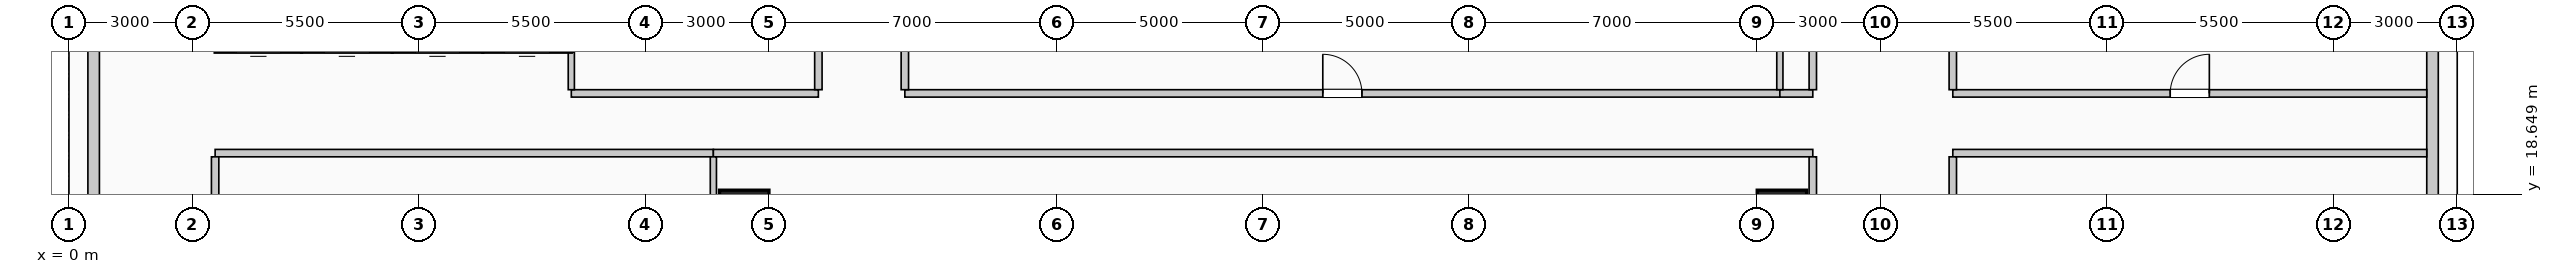
"""IFC4 building model, lengths in metres.
Left out: names, types, materials, properties, quantities, classifications, styles, units other than length and angle.
Written with IfcOpenShell. Run it as: python <this file> out.ifc"""

import sys

from ifc_helpers import new_model, si_unit, direction, frame, frame_2d, origin, origin_2d, place, context, subcontext, project, spatial, rectangle, extrude, element, fill, save


model = new_model("IFC4")
c1 = context("Model", 3, precision=1e-05, world=origin(), true_north=direction((0.0, 1.0)))
c2 = subcontext(c1, "Body", "Model", "MODEL_VIEW")
j1 = project(units=[si_unit("LENGTHUNIT", "METRE"), si_unit("PLANEANGLEUNIT", "RADIAN")], contexts=[c1])
p1 = place(None, origin())
s1 = spatial("IfcSite", under=j1, at=p1, CompositionType="ELEMENT")
p2 = place(p1, origin())
s2 = spatial("IfcBuilding", under=s1, at=p2, CompositionType="ELEMENT")
p3 = place(p2, frame((0.0, 0.0, 50.6)))
s3 = spatial("IfcBuildingStorey", under=s2, at=p3, CompositionType="ELEMENT", Elevation=50.6)
for number, where, z_axis, x_axis in (
    (1, (16.4, 18.0, 0.0), (0.0, 0.0, 1.0), (1.0, 0.0, 0.0)),
    (2, (41.6, 18.0, 0.0), (0.0, 0.0, 1.0), (1.0, 0.0, 0.0)),
):
    element("IfcColumn", number, at=place(p3, frame(where, z_axis=z_axis, x_axis=x_axis)), inside=s3, PredefinedType="COLUMN", context=c2, shape_type="SweptSolid", body=[
        extrude(rectangle(XDim=1.2, YDim=1.5, at=origin_2d()), origin(), (0.0, 0.0, 1.0), 4.0),
    ])
for number, where, z_axis, x_axis in (
    (3, (0.6, 18.47, 0.0), (0.0, 0.0, 1.0), (0.0, 1.0, 0.0)),
    (4, (57.4, 25.53, 0.0), (0.0, 0.0, 1.0), (0.0, -1.0, 0.0)),
):
    element("IfcWall", number, at=place(p3, frame(where, z_axis=z_axis, x_axis=x_axis)), inside=s3, PredefinedType="SOLIDWALL", context=c2, shape_type="SweptSolid", body=[
        extrude(rectangle(XDim=7.06, YDim=0.28, at=frame_2d((3.53, 0.0))), origin(), (0.0, 0.0, 1.0), 2.85),
    ])
p4 = place(p3, frame((5.65, 22.25, 0.0), z_axis=(0.0, 0.0, 1.0), x_axis=(-1.0, 0.0, 0.0)))
e5 = element("IfcWall", 5, at=p4, inside=s3, PredefinedType="SOLIDWALL", context=c2, shape_type="SweptSolid", body=[
    extrude(rectangle(XDim=2.1, YDim=0.3, at=frame_2d((1.05, 0.0))), origin(), (0.0, 0.0, 1.0), 4.0),
])
p5 = place(p4, frame((0.5, 0.0, 0.0)))
e6 = element("IfcOpeningElement", 6, at=p5, cuts=e5, PredefinedType="OPENING", context=c2, shape_type="SweptSolid", body=[
    extrude(rectangle(XDim=1.1, YDim=2.2, at=frame_2d((0.55, 1.1))), frame((0.0, 0.16, 0.0), z_axis=(0.0, -1.0, 0.0), x_axis=(1.0, 0.0, 0.0)), (0.0, 0.0, 1.0), 0.32),
])
p6 = place(p3, frame((7.85, 22.25, 0.0), z_axis=(0.0, 0.0, 1.0), x_axis=(-1.0, 0.0, 0.0)))
e7 = element("IfcWall", 7, at=p6, inside=s3, PredefinedType="SOLIDWALL", context=c2, shape_type="SweptSolid", body=[
    extrude(rectangle(XDim=2.2, YDim=0.3, at=frame_2d((1.1, 0.0))), origin(), (0.0, 0.0, 1.0), 4.0),
])
p7 = place(p6, frame((0.55, 0.0, 0.0)))
e8 = element("IfcOpeningElement", 8, at=p7, cuts=e7, PredefinedType="OPENING", context=c2, shape_type="SweptSolid", body=[
    extrude(rectangle(XDim=1.1, YDim=2.2, at=frame_2d((0.55, 1.1))), frame((0.0, 0.16, 0.0), z_axis=(0.0, -1.0, 0.0), x_axis=(1.0, 0.0, 0.0)), (0.0, 0.0, 1.0), 0.32),
])
p8 = place(p3, frame((10.05, 22.25, 0.0), z_axis=(0.0, 0.0, 1.0), x_axis=(-1.0, 0.0, 0.0)))
e9 = element("IfcWall", 9, at=p8, inside=s3, PredefinedType="SOLIDWALL", context=c2, shape_type="SweptSolid", body=[
    extrude(rectangle(XDim=2.2, YDim=0.3, at=frame_2d((1.1, 0.0))), origin(), (0.0, 0.0, 1.0), 4.0),
])
p9 = place(p8, frame((0.55, 0.0, 0.0)))
e10 = element("IfcOpeningElement", 10, at=p9, cuts=e9, PredefinedType="OPENING", context=c2, shape_type="SweptSolid", body=[
    extrude(rectangle(XDim=1.1, YDim=2.2, at=frame_2d((0.55, 1.1))), frame((0.0, 0.16, 0.0), z_axis=(0.0, -1.0, 0.0), x_axis=(1.0, 0.0, 0.0)), (0.0, 0.0, 1.0), 0.32),
])
p10 = place(p3, frame((12.2, 22.25, 0.0), z_axis=(0.0, 0.0, 1.0), x_axis=(-1.0, 0.0, 0.0)))
e11 = element("IfcWall", 11, at=p10, inside=s3, PredefinedType="SOLIDWALL", context=c2, shape_type="SweptSolid", body=[
    extrude(rectangle(XDim=2.15, YDim=0.3, at=frame_2d((1.075, 0.0))), origin(), (0.0, 0.0, 1.0), 4.0),
])
p11 = place(p10, frame((0.525, 0.0, 0.0)))
e12 = element("IfcOpeningElement", 12, at=p11, cuts=e11, PredefinedType="OPENING", context=c2, shape_type="SweptSolid", body=[
    extrude(rectangle(XDim=1.1, YDim=2.2, at=frame_2d((0.55, 1.1))), frame((0.0, 0.16, 0.0), z_axis=(0.0, -1.0, 0.0), x_axis=(1.0, 0.0, 0.0)), (0.0, 0.0, 1.0), 0.32),
])
p12 = place(p3, frame((3.55, 19.65, 0.0), z_axis=(0.0, 0.0, 1.0), x_axis=(1.0, 0.0, 0.0)))
e13 = element("IfcWall", 13, at=p12, inside=s3, PredefinedType="PARTITIONING", context=c2, shape_type="SweptSolid", body=[
    extrude(rectangle(XDim=12.1, YDim=0.18, at=frame_2d((6.05, 0.0))), origin(), (0.0, 0.0, 1.0), 3.7),
])
p13 = place(p3, frame((15.65, 19.65, 0.0), z_axis=(0.0, 0.0, 1.0), x_axis=(1.0, 0.0, 0.0)))
e14 = element("IfcWall", 14, at=p13, inside=s3, PredefinedType="PARTITIONING", context=c2, shape_type="SweptSolid", body=[
    extrude(rectangle(XDim=26.7, YDim=0.18, at=frame_2d((13.35, 0.0))), origin(), (0.0, 0.0, 1.0), 3.7),
])
p14 = place(p3, frame((45.75, 19.65, 0.0), z_axis=(0.0, 0.0, 1.0), x_axis=(1.0, 0.0, 0.0)))
e15 = element("IfcWall", 15, at=p14, inside=s3, PredefinedType="PARTITIONING", context=c2, shape_type="SweptSolid", body=[
    extrude(rectangle(XDim=11.51, YDim=0.18, at=frame_2d((5.755, 0.0))), origin(), (0.0, 0.0, 1.0), 3.7),
])
p15 = place(p3, frame((12.2, 21.1, 0.0), z_axis=(0.0, 0.0, 1.0), x_axis=(1.0, 0.0, 0.0)))
e16 = element("IfcWall", 16, at=p15, inside=s3, PredefinedType="PARTITIONING", context=c2, shape_type="SweptSolid", body=[
    extrude(rectangle(XDim=6.0, YDim=0.18, at=frame_2d((3.0, 0.0))), origin(), (0.0, 0.0, 1.0), 3.7),
])
p16 = place(p3, frame((20.3, 21.1, 0.0), z_axis=(0.0, 0.0, 1.0), x_axis=(1.0, 0.0, 0.0)))
e17 = element("IfcWall", 17, at=p16, inside=s3, PredefinedType="PARTITIONING", context=c2, shape_type="SweptSolid", body=[
    extrude(rectangle(XDim=21.25, YDim=0.18, at=frame_2d((10.625, 0.0))), origin(), (0.0, 0.0, 1.0), 3.7),
])
p17 = place(p16, frame((10.15, 0.0, 0.0)))
e18 = element("IfcOpeningElement", 18, at=p17, cuts=e17, PredefinedType="OPENING", context=c2, shape_type="SweptSolid", body=[
    extrude(rectangle(XDim=0.95, YDim=2.15, at=frame_2d((0.475, 1.075))), frame((0.0, 0.1, 0.0), z_axis=(0.0, -1.0, 0.0), x_axis=(1.0, 0.0, 0.0)), (0.0, 0.0, 1.0), 0.2),
])
p18 = place(p3, frame((41.55, 21.1, 0.0), z_axis=(0.0, 0.0, 1.0), x_axis=(1.0, 0.0, 0.0)))
e19 = element("IfcWall", 19, at=p18, inside=s3, PredefinedType="PARTITIONING", context=c2, shape_type="SweptSolid", body=[
    extrude(rectangle(XDim=0.8, YDim=0.18, at=frame_2d((0.4, 0.0))), origin(), (0.0, 0.0, 1.0), 3.7),
])
p19 = place(p3, frame((45.75, 21.1, 0.0), z_axis=(0.0, 0.0, 1.0), x_axis=(1.0, 0.0, 0.0)))
e20 = element("IfcWall", 20, at=p19, inside=s3, PredefinedType="PARTITIONING", context=c2, shape_type="SweptSolid", body=[
    extrude(rectangle(XDim=11.51, YDim=0.18, at=frame_2d((5.755, 0.0))), origin(), (0.0, 0.0, 1.0), 3.7),
])
p20 = place(p19, frame((5.28, 0.0, 0.0)))
e21 = element("IfcOpeningElement", 21, at=p20, cuts=e20, PredefinedType="OPENING", context=c2, shape_type="SweptSolid", body=[
    extrude(rectangle(XDim=0.95, YDim=2.15, at=frame_2d((0.475, 1.075))), frame((0.0, 0.1, 0.0), z_axis=(0.0, -1.0, 0.0), x_axis=(1.0, 0.0, 0.0)), (0.0, 0.0, 1.0), 0.2),
])
p21 = place(p3, frame((3.55, 16.39, 0.0), z_axis=(0.0, 0.0, 1.0), x_axis=(0.0, 1.0, 0.0)))
e22 = element("IfcWall", 22, at=p21, inside=s3, PredefinedType="PARTITIONING", context=c2, shape_type="SweptSolid", body=[
    extrude(rectangle(XDim=3.17, YDim=0.18, at=frame_2d((1.585, 0.0))), origin(), (0.0, 0.0, 1.0), 3.7),
])
p22 = place(p3, frame((12.2, 21.19, 0.0), z_axis=(0.0, 0.0, 1.0), x_axis=(0.0, 1.0, 0.0)))
e23 = element("IfcWall", 23, at=p22, inside=s3, PredefinedType="PARTITIONING", context=c2, shape_type="SweptSolid", body=[
    extrude(rectangle(XDim=0.91, YDim=0.15, at=frame_2d((0.455, 0.0))), origin(), (0.0, 0.0, 1.0), 3.7),
])
p23 = place(p3, frame((15.65, 16.39, 0.0), z_axis=(0.0, 0.0, 1.0), x_axis=(0.0, 1.0, 0.0)))
e24 = element("IfcWall", 24, at=p23, inside=s3, PredefinedType="PARTITIONING", context=c2, shape_type="SweptSolid", body=[
    extrude(rectangle(XDim=3.17, YDim=0.15, at=frame_2d((1.585, 0.0))), origin(), (0.0, 0.0, 1.0), 3.7),
])
for number, where, z_axis, x_axis in (
    (25, (18.2, 21.19, 0.0), (0.0, 0.0, 1.0), (0.0, 1.0, 0.0)),
    (26, (20.3, 21.19, 0.0), (0.0, 0.0, 1.0), (0.0, 1.0, 0.0)),
):
    element("IfcWall", number, at=place(p3, frame(where, z_axis=z_axis, x_axis=x_axis)), inside=s3, PredefinedType="PARTITIONING", context=c2, shape_type="SweptSolid", body=[
        extrude(rectangle(XDim=10.52, YDim=0.18, at=frame_2d((5.26, 0.0))), origin(), (0.0, 0.0, 1.0), 3.7),
    ])
p24 = place(p3, frame((41.55, 21.19, 0.0), z_axis=(0.0, 0.0, 1.0), x_axis=(0.0, 1.0, 0.0)))
e27 = element("IfcWall", 27, at=p24, inside=s3, PredefinedType="PARTITIONING", context=c2, shape_type="SweptSolid", body=[
    extrude(rectangle(XDim=4.06, YDim=0.15, at=frame_2d((2.03, 0.0))), origin(), (0.0, 0.0, 1.0), 2.995),
])
p25 = place(p3, frame((42.35, 16.39, 0.0), z_axis=(0.0, 0.0, 1.0), x_axis=(0.0, 1.0, 0.0)))
e28 = element("IfcWall", 28, at=p25, inside=s3, PredefinedType="PARTITIONING", context=c2, shape_type="SweptSolid", body=[
    extrude(rectangle(XDim=3.17, YDim=0.18, at=frame_2d((1.585, 0.0))), origin(), (0.0, 0.0, 1.0), 3.7),
])
p26 = place(p3, frame((42.35, 21.19, 0.0), z_axis=(0.0, 0.0, 1.0), x_axis=(0.0, 1.0, 0.0)))
e29 = element("IfcWall", 29, at=p26, inside=s3, PredefinedType="PARTITIONING", context=c2, shape_type="SweptSolid", body=[
    extrude(rectangle(XDim=11.085, YDim=0.18, at=frame_2d((5.542, 0.0))), origin(), (0.0, 0.0, 1.0), 3.7),
])
p27 = place(p3, frame((45.75, 16.39, 0.0), z_axis=(0.0, 0.0, 1.0), x_axis=(0.0, 1.0, 0.0)))
e30 = element("IfcWall", 30, at=p27, inside=s3, PredefinedType="PARTITIONING", context=c2, shape_type="SweptSolid", body=[
    extrude(rectangle(XDim=3.17, YDim=0.18, at=frame_2d((1.585, 0.0))), origin(), (0.0, 0.0, 1.0), 3.7),
])
p28 = place(p3, frame((45.75, 21.19, 0.0), z_axis=(0.0, 0.0, 1.0), x_axis=(0.0, 1.0, 0.0)))
e31 = element("IfcWall", 31, at=p28, inside=s3, PredefinedType="PARTITIONING", context=c2, shape_type="SweptSolid", body=[
    extrude(rectangle(XDim=11.085, YDim=0.18, at=frame_2d((5.542, 0.0))), origin(), (0.0, 0.0, 1.0), 3.7),
])
p29 = place(p17, origin())
e32 = element("IfcDoor", 32, at=p29, inside=s3, OperationType="SINGLE_SWING_LEFT", PredefinedType="DOOR", context=c2, shape_type="SweptSolid", body=[
    extrude(rectangle(XDim=0.95, YDim=2.15, at=frame_2d((0.475, 1.075))), frame((0.0, 0.025, 0.0), z_axis=(0.0, -1.0, 0.0), x_axis=(1.0, 0.0, 0.0)), (0.0, 0.0, 1.0), 0.05),
])
fill(e18, e32)
p30 = place(p20, origin())
e33 = element("IfcDoor", 33, at=p30, inside=s3, OperationType="SINGLE_SWING_RIGHT", PredefinedType="DOOR", context=c2, shape_type="SweptSolid", body=[
    extrude(rectangle(XDim=0.95, YDim=2.15, at=frame_2d((0.475, 1.075))), frame((0.0, 0.025, 0.0), z_axis=(0.0, -1.0, 0.0), x_axis=(1.0, 0.0, 0.0)), (0.0, 0.0, 1.0), 0.05),
])
fill(e21, e33)
save(model, sys.argv[1])
